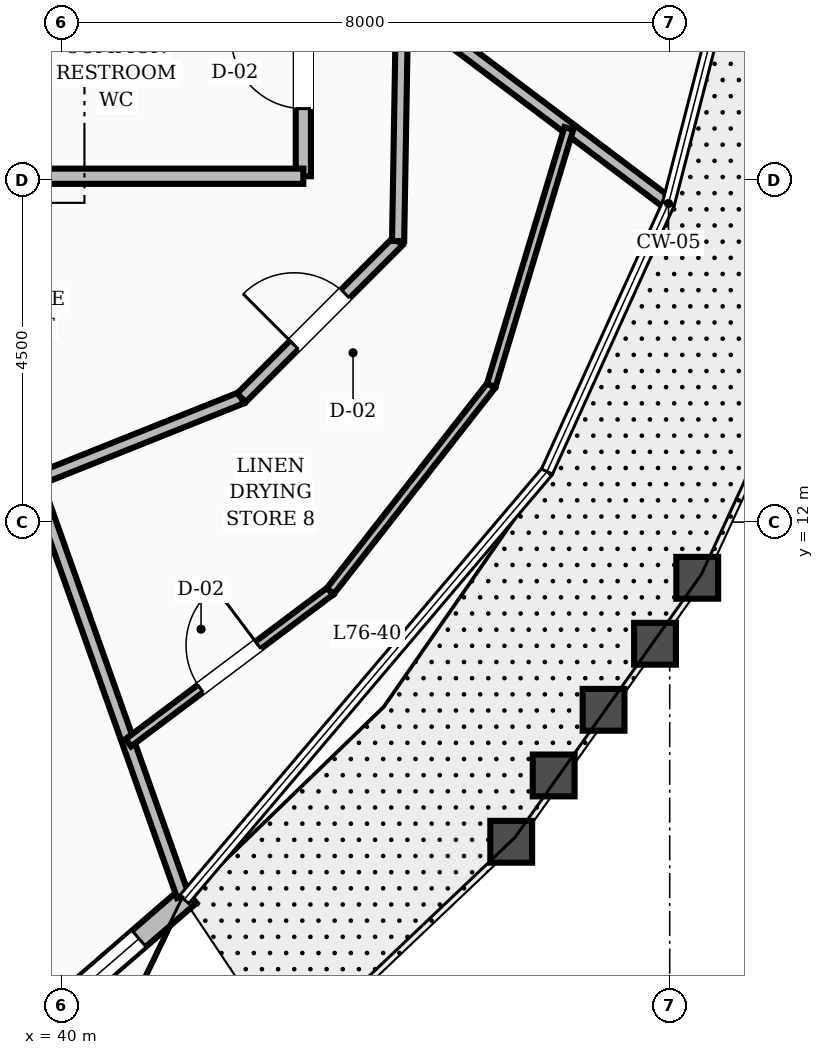
"""IFC4 building model, lengths in metres.
Left out: names, types, materials, properties, quantities, classifications, styles, units other than length and angle.
Written with IfcOpenShell. Run it as: python <this file> out.ifc"""

import sys

from ifc_helpers import new_model, si_unit, direction, frame, frame_2d, origin, place, context, subcontext, project, spatial, rectangle, extrude, element, fill, save


model = new_model("IFC4")
c1 = context("Model", 3, precision=1e-05, world=origin(), true_north=direction((0.0, 1.0)))
c2 = subcontext(c1, "Body", "Model", "MODEL_VIEW")
j1 = project(units=[si_unit("LENGTHUNIT", "METRE"), si_unit("PLANEANGLEUNIT", "RADIAN")], contexts=[c1])
p1 = place(None, origin())
s1 = spatial("IfcSite", under=j1, at=p1, CompositionType="ELEMENT")
p2 = place(p1, origin())
s2 = spatial("IfcBuilding", under=s1, at=p2, CompositionType="ELEMENT")
p3 = place(p2, frame((0.0, 0.0, 290.4)))
s3 = spatial("IfcBuildingStorey", under=s2, at=p3, CompositionType="ELEMENT", Elevation=290.4)
p4 = place(p3, frame((38.835, 4.632, 0.0), z_axis=(0.0, 0.0, 1.0), x_axis=(0.756185346013, 0.654357488286, 0.0)))
e1 = element("IfcWall", 1, at=p4, inside=s3, PredefinedType="STANDARD", context=c2, shape_type="SweptSolid", body=[
    extrude(rectangle(XDim=3.764, YDim=0.28, at=frame_2d((1.882, 0.0))), origin(), (0.0, 0.0, 1.0), 2.88),
])
p5 = place(p4, frame((0.786, 0.0, 0.8)))
e2 = element("IfcOpeningElement", 2, at=p5, cuts=e1, PredefinedType="OPENING", context=c2, shape_type="SweptSolid", body=[
    extrude(rectangle(XDim=2.1, YDim=1.65, at=frame_2d((1.05, 0.825))), frame((0.0, 0.15, 0.0), z_axis=(0.0, -1.0, 0.0), x_axis=(1.0, 0.0, 0.0)), (0.0, 0.0, 1.0), 0.3),
])
p6 = place(p3, frame((43.18, 16.55, 0.0), z_axis=(0.0, 0.0, 1.0), x_axis=(0.0, 1.0, 0.0)))
e3 = element("IfcWall", 3, at=p6, inside=s3, PredefinedType="SOLIDWALL", context=c2, shape_type="SweptSolid", body=[
    extrude(rectangle(XDim=2.73, YDim=0.2, at=frame_2d((1.365, 0.0))), origin(), (0.0, 0.0, 1.0), 2.87),
])
p7 = place(p6, frame((0.89, 0.0, 0.0)))
e4 = element("IfcOpeningElement", 4, at=p7, cuts=e3, PredefinedType="OPENING", context=c2, shape_type="SweptSolid", body=[
    extrude(rectangle(XDim=0.95, YDim=2.1, at=frame_2d((0.475, 1.05))), frame((0.0, 0.11, 0.0), z_axis=(0.0, -1.0, 0.0), x_axis=(1.0, 0.0, 0.0)), (0.0, 0.0, 1.0), 0.22),
])
p8 = place(p3, frame((39.2, 16.55, 0.0), z_axis=(0.0, 0.0, 1.0), x_axis=(1.0, 0.0, 0.0)))
e5 = element("IfcWall", 5, at=p8, inside=s3, PredefinedType="SOLIDWALL", context=c2, shape_type="SweptSolid", body=[
    extrude(rectangle(XDim=3.98, YDim=0.2, at=frame_2d((1.99, 0.0))), origin(), (0.0, 0.0, 1.0), 2.87),
])
p9 = place(p3, frame((39.651, 12.55, 0.0), z_axis=(0.0, 0.0, 1.0), x_axis=(0.92856882165, 0.371160266542, 0.0)))
e6 = element("IfcWall", 6, at=p9, inside=s3, PredefinedType="SOLIDWALL", context=c2, shape_type="SweptSolid", body=[
    extrude(rectangle(XDim=2.923, YDim=0.16, at=frame_2d((1.461, 0.0))), origin(), (0.0, 0.0, 1.0), 2.87),
])
p10 = place(p3, frame((42.365, 13.635, 0.0), z_axis=(0.0, 0.0, 1.0), x_axis=(0.707106781187, 0.707106781187, 0.0)))
e7 = element("IfcWall", 7, at=p10, inside=s3, PredefinedType="SOLIDWALL", context=c2, shape_type="SweptSolid", body=[
    extrude(rectangle(XDim=2.916, YDim=0.16, at=frame_2d((1.458, 0.0))), origin(), (0.0, 0.0, 1.0), 2.87),
])
p11 = place(p10, frame((0.983, 0.0, 0.0)))
e8 = element("IfcOpeningElement", 8, at=p11, cuts=e7, PredefinedType="OPENING", context=c2, shape_type="SweptSolid", body=[
    extrude(rectangle(XDim=0.95, YDim=2.1, at=frame_2d((0.475, 1.05))), frame((0.0, 0.09, 0.0), z_axis=(0.0, -1.0, 0.0), x_axis=(1.0, 0.0, 0.0)), (0.0, 0.0, 1.0), 0.18),
])
p12 = place(p3, frame((44.427, 15.697, 0.0), z_axis=(0.0, 0.0, 1.0), x_axis=(0.016981035134, 0.999855811828, 0.0)))
e9 = element("IfcWall", 9, at=p12, inside=s3, PredefinedType="SOLIDWALL", context=c2, shape_type="SweptSolid", body=[
    extrude(rectangle(XDim=3.134, YDim=0.16, at=frame_2d((1.567, 0.0))), origin(), (0.0, 0.0, 1.0), 2.87),
])
p13 = place(p3, frame((44.48, 18.831, 0.0), z_axis=(0.0, 0.0, 1.0), x_axis=(0.798823029679, -0.6015660955, 0.0)))
e10 = element("IfcWall", 10, at=p13, inside=s3, PredefinedType="SOLIDWALL", context=c2, shape_type="SweptSolid", body=[
    extrude(rectangle(XDim=4.337, YDim=0.16, at=frame_2d((2.168, 0.0))), origin(), (0.0, 0.0, 1.0), 2.87),
])
p14 = place(p3, frame((39.651, 12.55, 0.0), z_axis=(0.0, 0.0, 1.0), x_axis=(0.335043691545, -0.942202592204, 0.0)))
e11 = element("IfcWall", 11, at=p14, inside=s3, PredefinedType="SOLIDWALL", context=c2, shape_type="SweptSolid", body=[
    extrude(rectangle(XDim=5.804, YDim=0.16, at=frame_2d((2.902, 0.0))), origin(), (0.0, 0.0, 1.0), 2.87),
])
p15 = place(p3, frame((40.878, 9.098, 0.0), z_axis=(0.0, 0.0, 1.0), x_axis=(0.79971765819, 0.600376271332, 0.0)))
e12 = element("IfcWall", 12, at=p15, inside=s3, PredefinedType="PARTITIONING", context=c2, shape_type="SweptSolid", body=[
    extrude(rectangle(XDim=3.322, YDim=0.12, at=frame_2d((1.661, 0.0))), origin(), (0.0, 0.0, 1.0), 2.87),
])
p16 = place(p15, frame((1.186, 0.0, 0.0)))
e13 = element("IfcOpeningElement", 13, at=p16, cuts=e12, PredefinedType="OPENING", context=c2, shape_type="SweptSolid", body=[
    extrude(rectangle(XDim=0.95, YDim=2.1, at=frame_2d((0.475, 1.05))), frame((0.0, 0.07, 0.0), z_axis=(0.0, -1.0, 0.0), x_axis=(1.0, 0.0, 0.0)), (0.0, 0.0, 1.0), 0.14),
])
p17 = place(p3, frame((43.535, 11.092, 0.0), z_axis=(0.0, 0.0, 1.0), x_axis=(0.616264204791, 0.787539478307, 0.0)))
e14 = element("IfcWall", 14, at=p17, inside=s3, PredefinedType="PARTITIONING", context=c2, shape_type="SweptSolid", body=[
    extrude(rectangle(XDim=3.437, YDim=0.12, at=frame_2d((1.718, 0.0))), origin(), (0.0, 0.0, 1.0), 2.87),
])
p18 = place(p3, frame((45.653, 13.799, 0.0), z_axis=(0.0, 0.0, 1.0), x_axis=(0.289009374278, 0.957326267048, 0.0)))
e15 = element("IfcWall", 15, at=p18, inside=s3, PredefinedType="PARTITIONING", context=c2, shape_type="SweptSolid", body=[
    extrude(rectangle(XDim=3.531, YDim=0.12, at=frame_2d((1.766, 0.0))), origin(), (0.0, 0.0, 1.0), 2.87),
])
p19 = place(p5, origin())
e16 = element("IfcWindow", 16, at=p19, inside=s3, PartitioningType="SINGLE_PANEL", PredefinedType="WINDOW", context=c2, shape_type="SweptSolid", body=[
    extrude(rectangle(XDim=2.1, YDim=1.65, at=frame_2d((1.05, 0.825))), frame((0.0, 0.03, 0.0), z_axis=(0.0, -1.0, 0.0), x_axis=(1.0, 0.0, 0.0)), (0.0, 0.0, 1.0), 0.06),
])
fill(e2, e16)
p20 = place(p7, origin())
e17 = element("IfcDoor", 17, at=p20, inside=s3, OperationType="SINGLE_SWING_RIGHT", PredefinedType="DOOR", context=c2, shape_type="SweptSolid", body=[
    extrude(rectangle(XDim=0.95, YDim=2.1, at=frame_2d((0.475, 1.05))), frame((0.0, 0.025, 0.0), z_axis=(0.0, -1.0, 0.0), x_axis=(1.0, 0.0, 0.0)), (0.0, 0.0, 1.0), 0.05),
])
fill(e4, e17)
p21 = place(p11, origin())
e18 = element("IfcDoor", 18, at=p21, inside=s3, OperationType="SINGLE_SWING_LEFT", PredefinedType="DOOR", context=c2, shape_type="SweptSolid", body=[
    extrude(rectangle(XDim=0.95, YDim=2.1, at=frame_2d((0.475, 1.05))), frame((0.0, 0.025, 0.0), z_axis=(0.0, -1.0, 0.0), x_axis=(1.0, 0.0, 0.0)), (0.0, 0.0, 1.0), 0.05),
])
fill(e8, e18)
p22 = place(p16, origin())
e19 = element("IfcDoor", 19, at=p22, inside=s3, OperationType="SINGLE_SWING_RIGHT", PredefinedType="DOOR", context=c2, shape_type="SweptSolid", body=[
    extrude(rectangle(XDim=0.95, YDim=2.1, at=frame_2d((0.475, 1.05))), frame((0.0, 0.025, 0.0), z_axis=(0.0, -1.0, 0.0), x_axis=(1.0, 0.0, 0.0)), (0.0, 0.0, 1.0), 0.05),
])
fill(e13, e19)
save(model, sys.argv[1])
